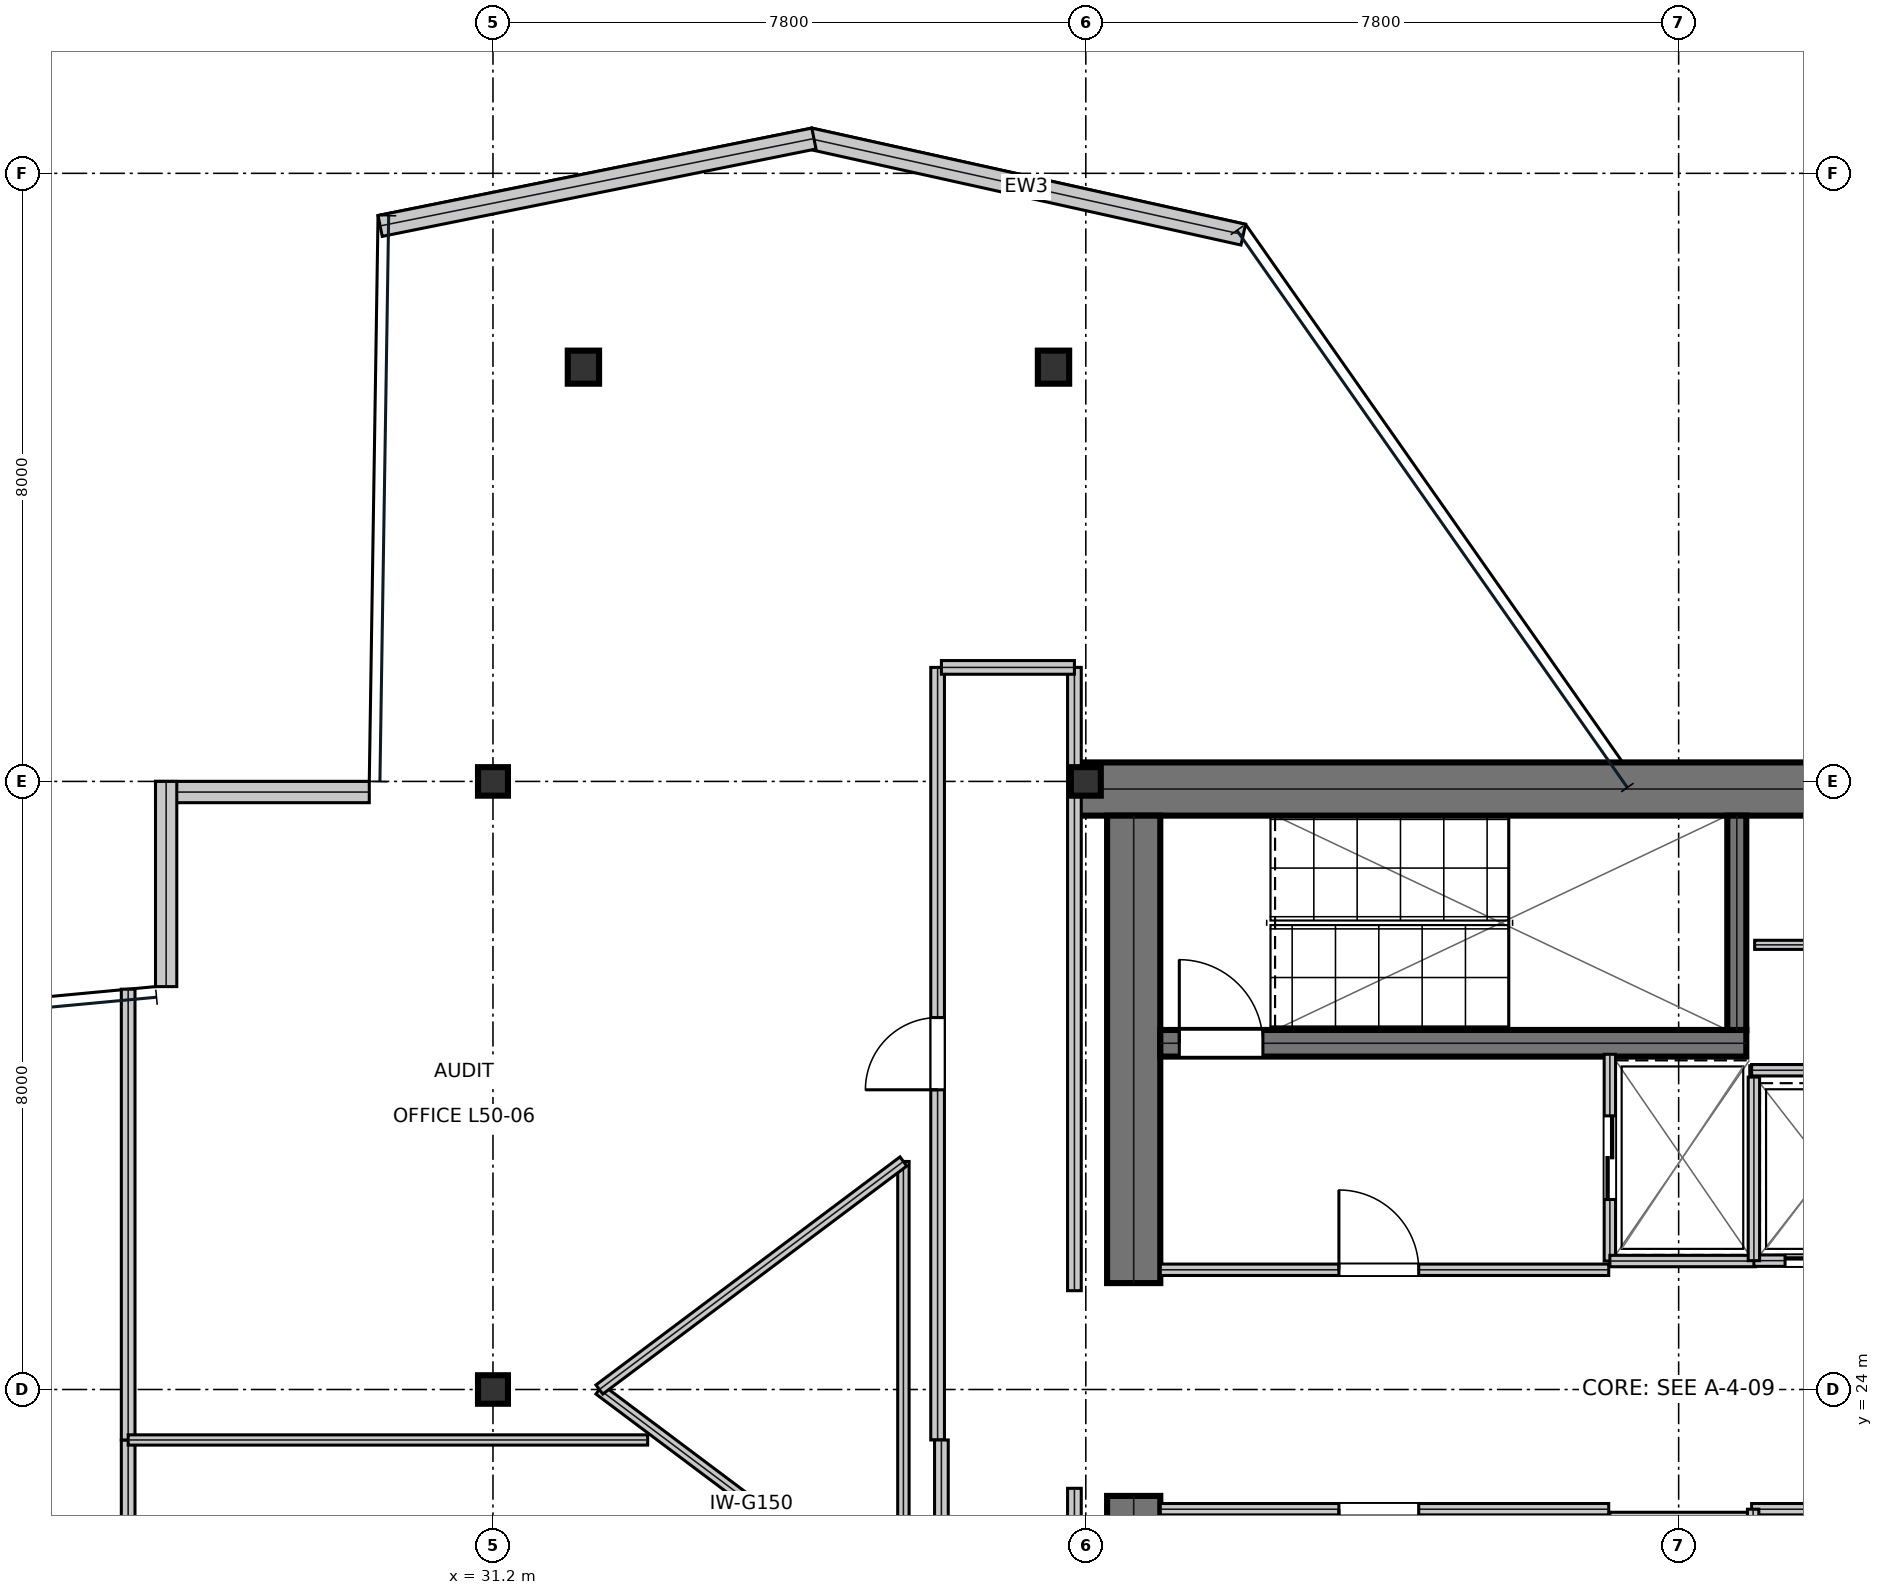
"""IFC4 building model, lengths in metres.
Left out: names, types, materials, properties, quantities, classifications, styles, units other than length and angle.
Written with IfcOpenShell. Run it as: python <this file> out.ifc"""

import sys

from ifc_helpers import new_model, si_unit, direction, frame, frame_2d, origin, origin_2d, place, context, subcontext, project, spatial, rectangle, i_section, extrude, element, fill, save


model = new_model("IFC4")
c1 = context("Model", 3, precision=1e-05, world=origin(), true_north=direction((0.0, 1.0)))
c2 = subcontext(c1, "Body", "Model", "MODEL_VIEW")
j1 = project(units=[si_unit("LENGTHUNIT", "METRE"), si_unit("PLANEANGLEUNIT", "RADIAN")], contexts=[c1])
p1 = place(None, origin())
s1 = spatial("IfcSite", under=j1, at=p1, CompositionType="ELEMENT")
p2 = place(p1, origin())
s2 = spatial("IfcBuilding", under=s1, at=p2, CompositionType="ELEMENT")
p3 = place(p2, frame((0.0, 0.0, 216.15)))
s3 = spatial("IfcBuildingStorey", under=s2, at=p3, CompositionType="ELEMENT", Elevation=216.15)
p4 = place(p3, frame((38.8, 31.9, 0.0), z_axis=(0.0, 0.0, 1.0), x_axis=(1.0, 0.0, 0.0)))
e1 = element("IfcWall", 1, at=p4, inside=s3, PredefinedType="SHEAR", context=c2, shape_type="SweptSolid", body=[
    extrude(rectangle(XDim=16.0, YDim=0.7, at=frame_2d((8.0, 0.0))), origin(), (0.0, 0.0, 1.0), 3.79),
])
for number, where, z_axis, x_axis in (
    (2, (39.63, 16.45, 0.0), (0.0, 0.0, 1.0), (0.0, 1.0, 0.0)),
    (3, (39.63, 25.4, 0.0), (0.0, 0.0, 1.0), (0.0, 1.0, 0.0)),
):
    element("IfcWall", number, at=place(p3, frame(where, z_axis=z_axis, x_axis=x_axis)), inside=s3, PredefinedType="SHEAR", context=c2, shape_type="SweptSolid", body=[
        extrude(rectangle(XDim=6.15, YDim=0.7, at=frame_2d((3.075, 0.0))), origin(), (0.0, 0.0, 1.0), 3.79),
    ])
p5 = place(p3, frame((39.98, 28.555, 0.0), z_axis=(0.0, 0.0, 1.0), x_axis=(1.0, 0.0, 0.0)))
e4 = element("IfcWall", 4, at=p5, inside=s3, PredefinedType="SHEAR", context=c2, shape_type="SweptSolid", body=[
    extrude(rectangle(XDim=7.71, YDim=0.35, at=frame_2d((3.855, 0.0))), origin(), (0.0, 0.0, 1.0), 3.79),
])
p6 = place(p5, frame((0.25, 0.0, 0.0)))
e5 = element("IfcOpeningElement", 5, at=p6, cuts=e4, PredefinedType="OPENING", context=c2, shape_type="SweptSolid", body=[
    extrude(rectangle(XDim=1.1, YDim=2.15, at=frame_2d((0.55, 1.075))), frame((0.0, 0.185, 0.0), z_axis=(0.0, -1.0, 0.0), x_axis=(1.0, 0.0, 0.0)), (0.0, 0.0, 1.0), 0.37),
])
p7 = place(p3, frame((47.565, 28.73, 0.0), z_axis=(0.0, 0.0, 1.0), x_axis=(0.0, 1.0, 0.0)))
e6 = element("IfcWall", 6, at=p7, inside=s3, PredefinedType="SHEAR", context=c2, shape_type="SweptSolid", body=[
    extrude(rectangle(XDim=2.82, YDim=0.25, at=frame_2d((1.41, 0.0))), origin(), (0.0, 0.0, 1.0), 3.79),
])
for number, where, z_axis, x_axis in (
    (7, (31.2, 24.0, 0.0), (0.0, 0.0, 1.0), (1.0, 0.0, 0.0)),
    (8, (31.2, 32.0, 0.0), (0.0, 0.0, 1.0), (1.0, 0.0, 0.0)),
    (9, (39.0, 32.0, 0.0), (0.0, 0.0, 1.0), (1.0, 0.0, 0.0)),
):
    element("IfcColumn", number, at=place(p3, frame(where, z_axis=z_axis, x_axis=x_axis)), inside=s3, PredefinedType="COLUMN", context=c2, shape_type="SweptSolid", body=[
        extrude(i_section(OverallWidth=0.394, OverallDepth=0.375, WebThickness=0.017, FlangeThickness=0.028, at=origin_2d()), origin(), (0.0, 0.0, 1.0), 4.044),
    ])
for number, where, z_axis, x_axis in (
    (10, (32.39, 37.45, 0.016), (0.0, 0.0, 1.0), (1.0, 0.0, 0.0)),
    (11, (38.575, 37.45, 0.016), (0.0, 0.0, 1.0), (1.0, 0.0, 0.0)),
):
    element("IfcColumn", number, at=place(p3, frame(where, z_axis=z_axis, x_axis=x_axis)), inside=s3, PredefinedType="COLUMN", context=c2, shape_type="SweptSolid", body=[
        extrude(i_section(OverallWidth=0.412, OverallDepth=0.435, WebThickness=0.036, FlangeThickness=0.058, at=origin_2d()), origin(), (0.0, 0.0, 1.0), 4.018),
    ])
p8 = place(p3, frame((41.072, 39.193, 0.0), z_axis=(0.0, 0.0, 1.0), x_axis=(-0.976309738065, 0.216377668346, 0.0)))
e12 = element("IfcWall", 12, at=p8, inside=s3, PredefinedType="STANDARD", context=c2, shape_type="SweptSolid", body=[
    extrude(rectangle(XDim=5.846, YDim=0.28, at=frame_2d((2.923, 0.0))), origin(), (0.0, 0.0, 1.0), 3.79),
])
p9 = place(p3, frame((35.423, 40.458, 0.0), z_axis=(0.0, 0.0, 1.0), x_axis=(-0.98030065813, -0.197511062146, 0.0)))
e13 = element("IfcWall", 13, at=p9, inside=s3, PredefinedType="STANDARD", context=c2, shape_type="SweptSolid", body=[
    extrude(rectangle(XDim=5.822, YDim=0.28, at=frame_2d((2.911, 0.0))), origin(), (0.0, 0.0, 1.0), 3.79),
])
p10 = place(p3, frame((29.573, 31.86, 0.0), z_axis=(0.0, 0.0, 1.0), x_axis=(-1.0, 0.0, 0.0)))
e14 = element("IfcWall", 14, at=p10, inside=s3, PredefinedType="STANDARD", context=c2, shape_type="SweptSolid", body=[
    extrude(rectangle(XDim=2.812, YDim=0.28, at=frame_2d((1.406, 0.0))), origin(), (0.0, 0.0, 1.0), 3.79),
])
p11 = place(p3, frame((26.9, 32.0, 0.0), z_axis=(0.0, 0.0, 1.0), x_axis=(0.0, -1.0, 0.0)))
e15 = element("IfcWall", 15, at=p11, inside=s3, PredefinedType="STANDARD", context=c2, shape_type="SweptSolid", body=[
    extrude(rectangle(XDim=2.7, YDim=0.28, at=frame_2d((1.35, 0.0))), origin(), (0.0, 0.0, 1.0), 3.319),
])
p12 = place(p3, frame((39.98, 25.575, 0.0), z_axis=(0.0, 0.0, 1.0), x_axis=(1.0, 0.0, 0.0)))
e16 = element("IfcWall", 16, at=p12, inside=s3, PredefinedType="PARTITIONING", context=c2, shape_type="SweptSolid", body=[
    extrude(rectangle(XDim=5.9, YDim=0.15, at=frame_2d((2.95, 0.0))), origin(), (0.0, 0.0, 1.0), 3.79),
])
p13 = place(p12, frame((2.35, 0.0, 0.0)))
e17 = element("IfcOpeningElement", 17, at=p13, cuts=e16, PredefinedType="OPENING", context=c2, shape_type="SweptSolid", body=[
    extrude(rectangle(XDim=1.05, YDim=2.15, at=frame_2d((0.525, 1.075))), frame((0.0, 0.085, 0.0), z_axis=(0.0, -1.0, 0.0), x_axis=(1.0, 0.0, 0.0)), (0.0, 0.0, 1.0), 0.17),
])
p14 = place(p3, frame((39.98, 22.425, 0.0), z_axis=(0.0, 0.0, 1.0), x_axis=(1.0, 0.0, 0.0)))
e18 = element("IfcWall", 18, at=p14, inside=s3, PredefinedType="PARTITIONING", context=c2, shape_type="SweptSolid", body=[
    extrude(rectangle(XDim=5.9, YDim=0.15, at=frame_2d((2.95, 0.0))), origin(), (0.0, 0.0, 1.0), 3.79),
])
p15 = place(p14, frame((2.35, 0.0, 0.0)))
e19 = element("IfcOpeningElement", 19, at=p15, cuts=e18, PredefinedType="OPENING", context=c2, shape_type="SweptSolid", body=[
    extrude(rectangle(XDim=1.05, YDim=2.15, at=frame_2d((0.525, 1.075))), frame((0.0, 0.085, 0.0), z_axis=(0.0, -1.0, 0.0), x_axis=(1.0, 0.0, 0.0)), (0.0, 0.0, 1.0), 0.17),
])
p16 = place(p3, frame((45.895, 25.69, 0.0), z_axis=(0.0, 0.0, 1.0), x_axis=(0.0, 1.0, 0.0)))
e20 = element("IfcWall", 20, at=p16, inside=s3, PredefinedType="PARTITIONING", context=c2, shape_type="SweptSolid", body=[
    extrude(rectangle(XDim=2.72, YDim=0.15, at=frame_2d((1.36, 0.0))), origin(), (0.0, 0.0, 1.0), 3.79),
])
p17 = place(p16, frame((0.81, 0.0, 0.0)))
e21 = element("IfcOpeningElement", 21, at=p17, cuts=e20, PredefinedType="OPENING", context=c2, shape_type="SweptSolid", body=[
    extrude(rectangle(XDim=1.1, YDim=2.15, at=frame_2d((0.55, 1.075))), frame((0.0, 0.085, 0.0), z_axis=(0.0, -1.0, 0.0), x_axis=(1.0, 0.0, 0.0)), (0.0, 0.0, 1.0), 0.17),
])
for number, where, z_axis, x_axis in (
    (22, (45.895, 25.69, 0.0), (0.0, 0.0, 1.0), (1.0, 0.0, 0.0)),
    (23, (45.895, 22.31, 0.0), (0.0, 0.0, 1.0), (1.0, 0.0, 0.0)),
):
    element("IfcWall", number, at=place(p3, frame(where, z_axis=z_axis, x_axis=x_axis)), inside=s3, PredefinedType="PARTITIONING", context=c2, shape_type="SweptSolid", body=[
        extrude(rectangle(XDim=1.915, YDim=0.15, at=frame_2d((0.958, 0.0))), origin(), (0.0, 0.0, 1.0), 3.79),
    ])
p18 = place(p3, frame((47.79, 25.695, 0.0), z_axis=(0.0, 0.0, 1.0), x_axis=(1.0, 0.0, 0.0)))
e24 = element("IfcWall", 24, at=p18, inside=s3, PredefinedType="PARTITIONING", context=c2, shape_type="SweptSolid", body=[
    extrude(rectangle(XDim=1.92, YDim=0.15, at=frame_2d((0.96, 0.0))), origin(), (0.0, 0.0, 1.0), 3.79),
])
p19 = place(p18, frame((0.41, 0.0, 0.0)))
e25 = element("IfcOpeningElement", 25, at=p19, cuts=e24, PredefinedType="OPENING", context=c2, shape_type="SweptSolid", body=[
    extrude(rectangle(XDim=1.1, YDim=2.15, at=frame_2d((0.55, 1.075))), frame((0.0, 0.085, 0.0), z_axis=(0.0, -1.0, 0.0), x_axis=(1.0, 0.0, 0.0)), (0.0, 0.0, 1.0), 0.17),
])
p20 = place(p3, frame((47.79, 25.695, 0.0), z_axis=(0.0, 0.0, 1.0), x_axis=(0.0, 1.0, 0.0)))
e26 = element("IfcWall", 26, at=p20, inside=s3, PredefinedType="PARTITIONING", context=c2, shape_type="SweptSolid", body=[
    extrude(rectangle(XDim=2.415, YDim=0.15, at=frame_2d((1.208, 0.0))), origin(), (0.0, 0.0, 1.0), 3.79),
])
p21 = place(p3, frame((47.76, 22.425, 0.0), z_axis=(0.0, 0.0, 1.0), x_axis=(1.0, 0.0, 0.0)))
e27 = element("IfcWall", 27, at=p21, inside=s3, PredefinedType="PARTITIONING", context=c2, shape_type="SweptSolid", body=[
    extrude(rectangle(XDim=1.96, YDim=0.15, at=frame_2d((0.98, 0.0))), origin(), (0.0, 0.0, 1.0), 3.79),
])
p22 = place(p3, frame((47.78, 16.45, 0.0), z_axis=(0.0, 0.0, 1.0), x_axis=(0.0, 1.0, 0.0)))
e28 = element("IfcWall", 28, at=p22, inside=s3, PredefinedType="PARTITIONING", context=c2, shape_type="SweptSolid", body=[
    extrude(rectangle(XDim=5.975, YDim=0.15, at=frame_2d((2.988, 0.0))), origin(), (0.0, 0.0, 1.0), 3.79),
])
p23 = place(p3, frame((47.76, 28.2, 0.0), z_axis=(0.0, 0.0, 1.0), x_axis=(1.0, 0.0, 0.0)))
e29 = element("IfcWall", 29, at=p23, inside=s3, PredefinedType="PARTITIONING", context=c2, shape_type="SweptSolid", body=[
    extrude(rectangle(XDim=2.04, YDim=0.15, at=frame_2d((1.02, 0.0))), origin(), (0.0, 0.0, 1.0), 3.79),
])
p24 = place(p3, frame((47.8, 29.85, 0.0), z_axis=(0.0, 0.0, 1.0), x_axis=(1.0, 0.0, 0.0)))
e30 = element("IfcWall", 30, at=p24, inside=s3, PredefinedType="PARTITIONING", context=c2, shape_type="SweptSolid", body=[
    extrude(rectangle(XDim=5.86, YDim=0.12, at=frame_2d((2.93, 0.0))), origin(), (0.0, 0.0, 1.0), 3.79),
])
p25 = place(p24, frame((2.6, 0.0, 0.0)))
e31 = element("IfcOpeningElement", 31, at=p25, cuts=e30, PredefinedType="OPENING", context=c2, shape_type="SweptSolid", body=[
    extrude(rectangle(XDim=0.85, YDim=2.15, at=frame_2d((0.425, 1.075))), frame((0.0, 0.07, 0.0), z_axis=(0.0, -1.0, 0.0), x_axis=(1.0, 0.0, 0.0)), (0.0, 0.0, 1.0), 0.14),
])
p26 = place(p3, frame((37.05, 23.336, 0.0), z_axis=(0.0, 0.0, 1.0), x_axis=(0.0, 1.0, 0.0)))
e32 = element("IfcWall", 32, at=p26, inside=s3, PredefinedType="SOLIDWALL", context=c2, shape_type="SweptSolid", body=[
    extrude(rectangle(XDim=10.164, YDim=0.18, at=frame_2d((5.082, 0.0))), origin(), (0.0, 0.0, 1.0), 3.241),
])
p27 = place(p26, frame((4.607, 0.0, 0.0)))
e33 = element("IfcOpeningElement", 33, at=p27, cuts=e32, PredefinedType="OPENING", context=c2, shape_type="SweptSolid", body=[
    extrude(rectangle(XDim=0.95, YDim=2.15, at=frame_2d((0.475, 1.075))), frame((0.0, 0.1, 0.0), z_axis=(0.0, -1.0, 0.0), x_axis=(1.0, 0.0, 0.0)), (0.0, 0.0, 1.0), 0.2),
])
p28 = place(p3, frame((38.85, 14.707, 0.0), z_axis=(0.0, 0.0, 1.0), x_axis=(0.0, 1.0, 0.0)))
e34 = element("IfcWall", 34, at=p28, inside=s3, PredefinedType="SOLIDWALL", context=c2, shape_type="SweptSolid", body=[
    extrude(rectangle(XDim=7.993, YDim=0.18, at=frame_2d((3.997, 0.0))), origin(), (0.0, 0.0, 1.0), 3.241),
])
p29 = place(p3, frame((26.4, 20.6, 0.0), z_axis=(0.0, 0.0, 1.0), x_axis=(0.0, 1.0, 0.0)))
e35 = element("IfcWall", 35, at=p29, inside=s3, PredefinedType="SOLIDWALL", context=c2, shape_type="SweptSolid", body=[
    extrude(rectangle(XDim=2.736, YDim=0.18, at=frame_2d((1.368, 0.0))), origin(), (0.0, 0.0, 1.0), 3.241),
])
p30 = place(p3, frame((37.1, 20.6, 0.0), z_axis=(0.0, 0.0, 1.0), x_axis=(0.0, 1.0, 0.0)))
e36 = element("IfcWall", 36, at=p30, inside=s3, PredefinedType="SOLIDWALL", context=c2, shape_type="SweptSolid", body=[
    extrude(rectangle(XDim=2.736, YDim=0.18, at=frame_2d((1.368, 0.0))), origin(), (0.0, 0.0, 1.0), 3.79),
])
p31 = place(p3, frame((38.85, 25.3, 0.0), z_axis=(0.0, 0.0, 1.0), x_axis=(0.0, 1.0, 0.0)))
e37 = element("IfcWall", 37, at=p31, inside=s3, PredefinedType="SOLIDWALL", context=c2, shape_type="SweptSolid", body=[
    extrude(rectangle(XDim=8.2, YDim=0.18, at=frame_2d((4.1, 0.0))), origin(), (0.0, 0.0, 1.0), 3.241),
])
p32 = place(p3, frame((26.4, 23.336, 0.0), z_axis=(0.0, 0.0, 1.0), x_axis=(0.0, 1.0, 0.0)))
e38 = element("IfcWall", 38, at=p32, inside=s3, PredefinedType="SOLIDWALL", context=c2, shape_type="SweptSolid", body=[
    extrude(rectangle(XDim=5.931, YDim=0.18, at=frame_2d((2.965, 0.0))), origin(), (0.0, 0.0, 1.0), 3.241),
])
p33 = place(p3, frame((37.1, 33.5, 0.0), z_axis=(0.0, 0.0, 1.0), x_axis=(1.0, 0.0, 0.0)))
e39 = element("IfcWall", 39, at=p33, inside=s3, PredefinedType="SOLIDWALL", context=c2, shape_type="SweptSolid", body=[
    extrude(rectangle(XDim=1.75, YDim=0.18, at=frame_2d((0.875, 0.0))), origin(), (0.0, 0.0, 1.0), 3.241),
])
p34 = place(p3, frame((26.4, 23.336, 0.0), z_axis=(0.0, 0.0, 1.0), x_axis=(1.0, 0.0, 0.0)))
e40 = element("IfcWall", 40, at=p34, inside=s3, PredefinedType="PARTITIONING", context=c2, shape_type="SweptSolid", body=[
    extrude(rectangle(XDim=6.835, YDim=0.135, at=frame_2d((3.418, 0.0))), origin(), (0.0, 0.0, 1.0), 3.241),
])
p35 = place(p3, frame((32.6, 24.0, 0.0), z_axis=(0.0, 0.0, 1.0), x_axis=(0.8, -0.6, 0.0)))
e41 = element("IfcWall", 41, at=p35, inside=s3, PredefinedType="MOVABLE", context=c2, shape_type="SweptSolid", body=[
    extrude(rectangle(XDim=5.0, YDim=0.15, at=frame_2d((2.5, 0.0))), origin(), (0.0, 0.0, 1.0), 3.79),
])
p36 = place(p3, frame((36.6, 21.0, 0.0), z_axis=(0.0, 0.0, 1.0), x_axis=(0.0, 1.0, 0.0)))
e42 = element("IfcWall", 42, at=p36, inside=s3, PredefinedType="MOVABLE", context=c2, shape_type="SweptSolid", body=[
    extrude(rectangle(XDim=6.0, YDim=0.15, at=frame_2d((3.0, 0.0))), origin(), (0.0, 0.0, 1.0), 3.79),
])
p37 = place(p3, frame((36.6, 27.0, 0.0), z_axis=(0.0, 0.0, 1.0), x_axis=(-0.8, -0.6, 0.0)))
e43 = element("IfcWall", 43, at=p37, inside=s3, PredefinedType="MOVABLE", context=c2, shape_type="SweptSolid", body=[
    extrude(rectangle(XDim=5.0, YDim=0.15, at=frame_2d((2.5, 0.0))), origin(), (0.0, 0.0, 1.0), 3.79),
])
p38 = place(p13, origin())
e44 = element("IfcDoor", 44, at=p38, inside=s3, OperationType="SINGLE_SWING_LEFT", PredefinedType="DOOR", context=c2, shape_type="SweptSolid", body=[
    extrude(rectangle(XDim=1.05, YDim=2.15, at=frame_2d((0.525, 1.075))), frame((0.0, 0.025, 0.0), z_axis=(0.0, -1.0, 0.0), x_axis=(1.0, 0.0, 0.0)), (0.0, 0.0, 1.0), 0.05),
])
fill(e17, e44)
p39 = place(p15, frame((1.05, 0.0, 0.0), z_axis=(0.0, 0.0, 1.0), x_axis=(-1.0, 0.0, 0.0)))
e45 = element("IfcDoor", 45, at=p39, inside=s3, OperationType="SINGLE_SWING_RIGHT", PredefinedType="DOOR", context=c2, shape_type="SweptSolid", body=[
    extrude(rectangle(XDim=1.05, YDim=2.15, at=frame_2d((0.525, 1.075))), frame((0.0, 0.025, 0.0), z_axis=(0.0, -1.0, 0.0), x_axis=(1.0, 0.0, 0.0)), (0.0, 0.0, 1.0), 0.05),
])
fill(e19, e45)
p40 = place(p17, frame((1.1, 0.0, 0.0), z_axis=(0.0, 0.0, 1.0), x_axis=(-1.0, 0.0, 0.0)))
e46 = element("IfcDoor", 46, at=p40, inside=s3, OperationType="DOUBLE_DOOR_SLIDING", PredefinedType="DOOR", context=c2, shape_type="SweptSolid", body=[
    extrude(rectangle(XDim=1.1, YDim=2.15, at=frame_2d((0.55, 1.075))), frame((0.0, 0.025, 0.0), z_axis=(0.0, -1.0, 0.0), x_axis=(1.0, 0.0, 0.0)), (0.0, 0.0, 1.0), 0.05),
])
fill(e21, e46)
p41 = place(p19, frame((1.1, 0.0, 0.0), z_axis=(0.0, 0.0, 1.0), x_axis=(-1.0, 0.0, 0.0)))
e47 = element("IfcDoor", 47, at=p41, inside=s3, OperationType="DOUBLE_DOOR_SLIDING", PredefinedType="DOOR", context=c2, shape_type="SweptSolid", body=[
    extrude(rectangle(XDim=1.1, YDim=2.15, at=frame_2d((0.55, 1.075))), frame((0.0, 0.025, 0.0), z_axis=(0.0, -1.0, 0.0), x_axis=(1.0, 0.0, 0.0)), (0.0, 0.0, 1.0), 0.05),
])
fill(e25, e47)
p42 = place(p27, origin())
e48 = element("IfcDoor", 48, at=p42, inside=s3, OperationType="SINGLE_SWING_LEFT", PredefinedType="DOOR", context=c2, shape_type="SweptSolid", body=[
    extrude(rectangle(XDim=0.95, YDim=2.15, at=frame_2d((0.475, 1.075))), frame((0.0, 0.025, 0.0), z_axis=(0.0, -1.0, 0.0), x_axis=(1.0, 0.0, 0.0)), (0.0, 0.0, 1.0), 0.05),
])
fill(e33, e48)
p43 = place(p6, origin())
e49 = element("IfcDoor", 49, at=p43, inside=s3, OperationType="SINGLE_SWING_LEFT", PredefinedType="DOOR", context=c2, shape_type="SweptSolid", body=[
    extrude(rectangle(XDim=1.1, YDim=2.15, at=frame_2d((0.55, 1.075))), frame((0.0, 0.025, 0.0), z_axis=(0.0, -1.0, 0.0), x_axis=(1.0, 0.0, 0.0)), (0.0, 0.0, 1.0), 0.05),
])
fill(e5, e49)
save(model, sys.argv[1])
